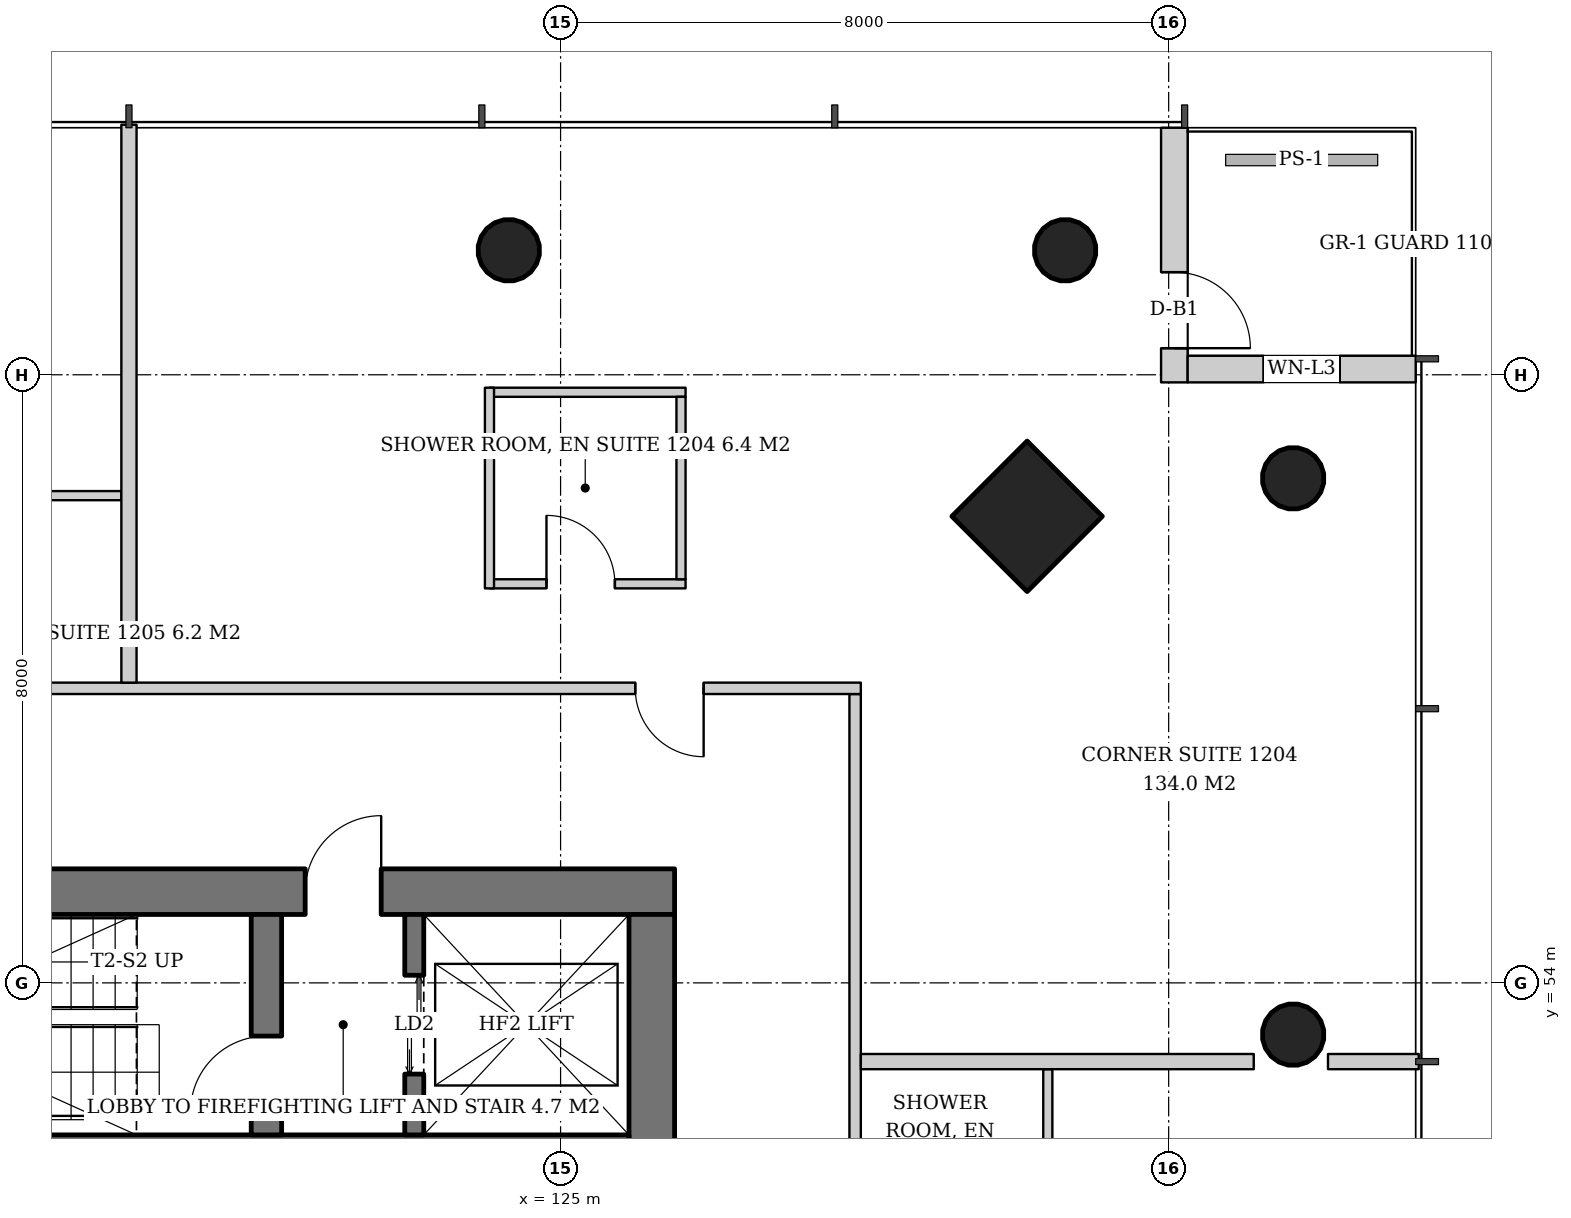
"""IFC4 building model, lengths in metres.
Left out: names, types, materials, properties, quantities, classifications, styles, units other than length and angle.
Written with IfcOpenShell. Run it as: python <this file> out.ifc"""

import sys

from ifc_helpers import new_model, si_unit, direction, frame, frame_2d, origin, origin_2d, place, context, subcontext, project, spatial, rectangle, hollow_circle, extrude, element, fill, save


model = new_model("IFC4")
c1 = context("Model", 3, precision=1e-05, world=origin(), true_north=direction((0.0, 1.0)))
c2 = subcontext(c1, "Body", "Model", "MODEL_VIEW")
j1 = project(units=[si_unit("LENGTHUNIT", "METRE"), si_unit("PLANEANGLEUNIT", "RADIAN")], contexts=[c1])
p1 = place(None, origin())
s1 = spatial("IfcSite", under=j1, at=p1, CompositionType="ELEMENT")
p2 = place(p1, origin())
s2 = spatial("IfcBuilding", under=s1, at=p2, CompositionType="ELEMENT")
p3 = place(p2, frame((0.0, 0.0, 51.4)))
s3 = spatial("IfcBuildingStorey", under=s2, at=p3, CompositionType="ELEMENT", Elevation=51.4)
p4 = place(p3, frame((131.19, 60.19, 0.0), z_axis=(-0.043029647111, -0.043029647111, 0.998146732169), x_axis=(0.707106781187, -0.707106781187, 0.0)))
e1 = element("IfcColumn", 1, at=p4, inside=s3, PredefinedType="COLUMN", context=c2, shape_type="SweptSolid", body=[
    extrude(rectangle(XDim=1.4, YDim=1.4, at=origin_2d()), origin(), (0.0, 0.0, 1.0), 3.807),
])
p5 = place(p3, frame((134.69, 60.69, 0.0), z_axis=(-0.043029647111, -0.043029647111, 0.998146732169), x_axis=(0.707106781187, -0.707106781187, 0.0)))
e2 = element("IfcColumn", 2, at=p5, inside=s3, PredefinedType="COLUMN", context=c2, shape_type="SweptSolid", body=[
    extrude(hollow_circle(Radius=0.406, WallThickness=0.03, at=origin_2d()), origin(), (0.0, 0.0, 1.0), 3.807),
])
p6 = place(p3, frame((134.69, 53.345, 0.0), z_axis=(-0.043059584825, -0.021497706284, 0.998841188968), x_axis=(0.446680166538, -0.894693706707, 0.0)))
e3 = element("IfcColumn", 3, at=p6, inside=s3, PredefinedType="COLUMN", context=c2, shape_type="SweptSolid", body=[
    extrude(hollow_circle(Radius=0.406, WallThickness=0.03, at=origin_2d()), origin(), (0.0, 0.0, 1.0), 3.804),
])
p7 = place(p3, frame((131.69, 63.69, 0.0), z_axis=(-0.043029647111, -0.043029647111, 0.998146732169), x_axis=(0.707106781187, -0.707106781187, 0.0)))
e4 = element("IfcColumn", 4, at=p7, inside=s3, PredefinedType="COLUMN", context=c2, shape_type="SweptSolid", body=[
    extrude(hollow_circle(Radius=0.406, WallThickness=0.03, at=origin_2d()), origin(), (0.0, 0.0, 1.0), 3.807),
])
p8 = place(p3, frame((124.345, 63.69, 0.0), z_axis=(-0.021497706284, -0.043059584825, 0.998841188968), x_axis=(0.894693706707, -0.446680166538, 0.0)))
e5 = element("IfcColumn", 5, at=p8, inside=s3, PredefinedType="COLUMN", context=c2, shape_type="SweptSolid", body=[
    extrude(hollow_circle(Radius=0.406, WallThickness=0.03, at=origin_2d()), origin(), (0.0, 0.0, 1.0), 3.804),
])
p9 = place(p3, frame((107.5, 55.2, 0.0), z_axis=(0.0, 0.0, 1.0), x_axis=(1.0, 0.0, 0.0)))
e6 = element("IfcWall", 6, at=p9, inside=s3, PredefinedType="SHEAR", context=c2, shape_type="SweptSolid", body=[
    extrude(rectangle(XDim=19.0, YDim=0.6, at=frame_2d((9.5, 0.0))), origin(), (0.0, 0.0, 1.0), 3.8),
])
p10 = place(p9, frame((14.14, 0.0, 0.0)))
e7 = element("IfcOpeningElement", 7, at=p10, cuts=e6, PredefinedType="OPENING", context=c2, shape_type="SweptSolid", body=[
    extrude(rectangle(XDim=1.0, YDim=2.1, at=frame_2d((0.5, 1.05))), frame((0.0, 0.31, 0.0), z_axis=(0.0, -1.0, 0.0), x_axis=(1.0, 0.0, 0.0)), (0.0, 0.0, 1.0), 0.62),
])
p11 = place(p9, frame((2.425, 0.0, 0.0)))
e8 = element("IfcOpeningElement", 8, at=p11, cuts=e6, PredefinedType="OPENING", context=c2, shape_type="SweptSolid", body=[
    extrude(rectangle(XDim=1.0, YDim=2.1, at=frame_2d((0.5, 1.05))), frame((0.0, 0.31, 0.0), z_axis=(0.0, -1.0, 0.0), x_axis=(1.0, 0.0, 0.0)), (0.0, 0.0, 1.0), 0.62),
])
p12 = place(p3, frame((126.2, 37.1, 0.0), z_axis=(0.0, 0.0, 1.0), x_axis=(0.0, 1.0, 0.0)))
e9 = element("IfcWall", 9, at=p12, inside=s3, PredefinedType="SHEAR", context=c2, shape_type="SweptSolid", body=[
    extrude(rectangle(XDim=17.8, YDim=0.6, at=frame_2d((8.9, 0.0))), origin(), (0.0, 0.0, 1.0), 3.8),
])
p13 = place(p12, frame((8.0, 0.0, 0.0)))
e10 = element("IfcOpeningElement", 10, at=p13, cuts=e9, PredefinedType="OPENING", context=c2, shape_type="SweptSolid", body=[
    extrude(rectangle(XDim=1.8, YDim=2.4, at=frame_2d((0.9, 1.2))), frame((0.0, 0.31, 0.0), z_axis=(0.0, -1.0, 0.0), x_axis=(1.0, 0.0, 0.0)), (0.0, 0.0, 1.0), 0.62),
])
p14 = place(p3, frame((108.1, 51.8, 0.0), z_axis=(0.0, 0.0, 1.0), x_axis=(1.0, 0.0, 0.0)))
e11 = element("IfcWall", 11, at=p14, inside=s3, PredefinedType="SHEAR", context=c2, shape_type="SweptSolid", body=[
    extrude(rectangle(XDim=17.8, YDim=0.4, at=frame_2d((8.9, 0.0))), origin(), (0.0, 0.0, 1.0), 3.8),
])
p15 = place(p3, frame((121.13, 52.0, 0.0), z_axis=(0.0, 0.0, 1.0), x_axis=(0.0, 1.0, 0.0)))
e12 = element("IfcWall", 12, at=p15, inside=s3, PredefinedType="SHEAR", context=c2, shape_type="SweptSolid", body=[
    extrude(rectangle(XDim=2.9, YDim=0.4, at=frame_2d((1.45, 0.0))), origin(), (0.0, 0.0, 1.0), 3.8),
])
p16 = place(p15, frame((0.3, 0.0, 0.0)))
e13 = element("IfcOpeningElement", 13, at=p16, cuts=e12, PredefinedType="OPENING", context=c2, shape_type="SweptSolid", body=[
    extrude(rectangle(XDim=1.0, YDim=2.1, at=frame_2d((0.5, 1.05))), frame((0.0, 0.21, 0.0), z_axis=(0.0, -1.0, 0.0), x_axis=(1.0, 0.0, 0.0)), (0.0, 0.0, 1.0), 0.42),
])
p17 = place(p3, frame((133.075, 65.25, 0.0), z_axis=(0.0, 0.0, 1.0), x_axis=(0.0, -1.0, 0.0)))
e14 = element("IfcWall", 14, at=p17, inside=s3, PredefinedType="SOLIDWALL", context=c2, shape_type="SweptSolid", body=[
    extrude(rectangle(XDim=3.35, YDim=0.35, at=frame_2d((1.675, 0.0))), origin(), (0.0, 0.0, 1.0), 3.6),
])
p18 = place(p17, frame((1.9, 0.0, 0.0)))
e15 = element("IfcOpeningElement", 15, at=p18, cuts=e14, PredefinedType="OPENING", context=c2, shape_type="SweptSolid", body=[
    extrude(rectangle(XDim=1.0, YDim=2.4, at=frame_2d((0.5, 1.2))), frame((0.0, 0.185, 0.0), z_axis=(0.0, -1.0, 0.0), x_axis=(1.0, 0.0, 0.0)), (0.0, 0.0, 1.0), 0.37),
])
p19 = place(p3, frame((133.25, 62.075, 0.0), z_axis=(0.0, 0.0, 1.0), x_axis=(1.0, 0.0, 0.0)))
e16 = element("IfcWall", 16, at=p19, inside=s3, PredefinedType="SOLIDWALL", context=c2, shape_type="SweptSolid", body=[
    extrude(rectangle(XDim=3.0, YDim=0.35, at=frame_2d((1.5, 0.0))), origin(), (0.0, 0.0, 1.0), 3.6),
])
p20 = place(p19, frame((1.0, 0.0, 0.9)))
e17 = element("IfcOpeningElement", 17, at=p20, cuts=e16, PredefinedType="OPENING", context=c2, shape_type="SweptSolid", body=[
    extrude(rectangle(XDim=1.0, YDim=2.4, at=frame_2d((0.5, 1.2))), frame((0.0, 0.185, 0.0), z_axis=(0.0, -1.0, 0.0), x_axis=(1.0, 0.0, 0.0)), (0.0, 0.0, 1.0), 0.37),
])
p21 = place(p3, frame((123.075, 52.0, 0.0), z_axis=(0.0, 0.0, 1.0), x_axis=(0.0, 1.0, 0.0)))
e18 = element("IfcWall", 18, at=p21, inside=s3, PredefinedType="SHEAR", context=c2, shape_type="SweptSolid", body=[
    extrude(rectangle(XDim=2.9, YDim=0.25, at=frame_2d((1.45, 0.0))), origin(), (0.0, 0.0, 1.0), 3.8),
])
p22 = place(p21, frame((0.8, 0.0, 0.0)))
e19 = element("IfcOpeningElement", 19, at=p22, cuts=e18, PredefinedType="OPENING", context=c2, shape_type="SweptSolid", body=[
    extrude(rectangle(XDim=1.3, YDim=2.2, at=frame_2d((0.65, 1.1))), frame((0.0, 0.135, 0.0), z_axis=(0.0, -1.0, 0.0), x_axis=(1.0, 0.0, 0.0)), (0.0, 0.0, 1.0), 0.27),
])
p23 = place(p3, frame((131.41, 50.144, 0.0), z_axis=(0.0, 0.0, 1.0), x_axis=(0.0, 1.0, 0.0)))
e20 = element("IfcWall", 20, at=p23, inside=s3, PredefinedType="PARTITIONING", context=c2, shape_type="SweptSolid", body=[
    extrude(rectangle(XDim=2.72, YDim=0.12, at=frame_2d((1.36, 0.0))), origin(), (0.0, 0.0, 1.0), 2.847),
])
p24 = place(p3, frame((128.875, 34.05, 0.0), z_axis=(0.0, 0.0, 1.0), x_axis=(0.0, 1.0, 0.0)))
e21 = element("IfcWall", 21, at=p24, inside=s3, PredefinedType="PARTITIONING", context=c2, shape_type="SweptSolid", body=[
    extrude(rectangle(XDim=23.75, YDim=0.15, at=frame_2d((11.875, 0.0))), origin(), (0.0, 0.0, 1.0), 2.8),
])
p25 = place(p24, frame((2.068, 0.0, 0.0)))
e22 = element("IfcOpeningElement", 22, at=p25, cuts=e21, PredefinedType="OPENING", context=c2, shape_type="SweptSolid", body=[
    extrude(rectangle(XDim=0.9, YDim=2.1, at=frame_2d((0.45, 1.05))), frame((0.0, 0.085, 0.0), z_axis=(0.0, -1.0, 0.0), x_axis=(1.0, 0.0, 0.0)), (0.0, 0.0, 1.0), 0.17),
])
p26 = place(p24, frame((7.736, 0.0, 0.0)))
e23 = element("IfcOpeningElement", 23, at=p26, cuts=e21, PredefinedType="OPENING", context=c2, shape_type="SweptSolid", body=[
    extrude(rectangle(XDim=0.9, YDim=2.1, at=frame_2d((0.45, 1.05))), frame((0.0, 0.085, 0.0), z_axis=(0.0, -1.0, 0.0), x_axis=(1.0, 0.0, 0.0)), (0.0, 0.0, 1.0), 0.17),
])
p27 = place(p24, frame((15.014, 0.0, 0.0)))
e24 = element("IfcOpeningElement", 24, at=p27, cuts=e21, PredefinedType="OPENING", context=c2, shape_type="SweptSolid", body=[
    extrude(rectangle(XDim=0.9, YDim=2.1, at=frame_2d((0.45, 1.05))), frame((0.0, 0.085, 0.0), z_axis=(0.0, -1.0, 0.0), x_axis=(1.0, 0.0, 0.0)), (0.0, 0.0, 1.0), 0.17),
])
p28 = place(p3, frame((128.95, 52.964, 0.0), z_axis=(0.0, 0.0, 1.0), x_axis=(1.0, 0.0, 0.0)))
e25 = element("IfcWall", 25, at=p28, inside=s3, PredefinedType="PARTITIONING", context=c2, shape_type="SweptSolid", body=[
    extrude(rectangle(XDim=5.169, YDim=0.2, at=frame_2d((2.585, 0.0))), origin(), (0.0, 0.0, 1.0), 3.6),
])
p29 = place(p3, frame((135.096, 52.964, 0.0), z_axis=(0.0, 0.0, 1.0), x_axis=(1.0, 0.0, 0.0)))
e26 = element("IfcWall", 26, at=p29, inside=s3, PredefinedType="PARTITIONING", context=c2, shape_type="SweptSolid", body=[
    extrude(rectangle(XDim=1.194, YDim=0.2, at=frame_2d((0.597, 0.0))), origin(), (0.0, 0.0, 1.0), 3.6),
])
p30 = place(p3, frame((124.064, 59.25, 0.0), z_axis=(0.0, 0.0, 1.0), x_axis=(1.0, 0.0, 0.0)))
e27 = element("IfcWall", 27, at=p30, inside=s3, PredefinedType="PARTITIONING", context=c2, shape_type="SweptSolid", body=[
    extrude(rectangle(XDim=2.58, YDim=0.12, at=frame_2d((1.29, 0.0))), origin(), (0.0, 0.0, 1.0), 2.8),
])
p31 = place(p30, frame((0.75, 0.0, 0.0)))
e28 = element("IfcOpeningElement", 28, at=p31, cuts=e27, PredefinedType="OPENING", context=c2, shape_type="SweptSolid", body=[
    extrude(rectangle(XDim=0.9, YDim=2.1, at=frame_2d((0.45, 1.05))), frame((0.0, 0.07, 0.0), z_axis=(0.0, -1.0, 0.0), x_axis=(1.0, 0.0, 0.0)), (0.0, 0.0, 1.0), 0.14),
])
p32 = place(p3, frame((124.064, 61.77, 0.0), z_axis=(0.0, 0.0, 1.0), x_axis=(1.0, 0.0, 0.0)))
e29 = element("IfcWall", 29, at=p32, inside=s3, PredefinedType="PARTITIONING", context=c2, shape_type="SweptSolid", body=[
    extrude(rectangle(XDim=2.58, YDim=0.12, at=frame_2d((1.29, 0.0))), origin(), (0.0, 0.0, 1.0), 2.8),
])
p33 = place(p3, frame((126.584, 59.31, 0.0), z_axis=(0.0, 0.0, 1.0), x_axis=(0.0, 1.0, 0.0)))
e30 = element("IfcWall", 30, at=p33, inside=s3, PredefinedType="PARTITIONING", context=c2, shape_type="SweptSolid", body=[
    extrude(rectangle(XDim=2.4, YDim=0.12, at=frame_2d((1.2, 0.0))), origin(), (0.0, 0.0, 1.0), 3.6),
])
p34 = place(p3, frame((124.064, 59.19, 0.0), z_axis=(0.0, 0.0, 1.0), x_axis=(0.0, 1.0, 0.0)))
e31 = element("IfcWall", 31, at=p34, inside=s3, PredefinedType="PARTITIONING", context=c2, shape_type="SweptSolid", body=[
    extrude(rectangle(XDim=2.64, YDim=0.12, at=frame_2d((1.32, 0.0))), origin(), (0.0, 0.0, 1.0), 3.6),
])
p35 = place(p3, frame((119.221, 60.41, 0.0), z_axis=(0.0, 0.0, 1.0), x_axis=(-1.0, 0.0, 0.0)))
e32 = element("IfcWall", 32, at=p35, inside=s3, PredefinedType="PARTITIONING", context=c2, shape_type="SweptSolid", body=[
    extrude(rectangle(XDim=2.42, YDim=0.12, at=frame_2d((1.21, 0.0))), origin(), (0.0, 0.0, 1.0), 2.847),
])
p36 = place(p3, frame((128.95, 57.875, 0.0), z_axis=(0.0, 0.0, 1.0), x_axis=(-1.0, 0.0, 0.0)))
e33 = element("IfcWall", 33, at=p36, inside=s3, PredefinedType="PARTITIONING", context=c2, shape_type="SweptSolid", body=[
    extrude(rectangle(XDim=23.75, YDim=0.15, at=frame_2d((11.875, 0.0))), origin(), (0.0, 0.0, 1.0), 2.8),
])
p37 = place(p36, frame((2.068, 0.0, 0.0)))
e34 = element("IfcOpeningElement", 34, at=p37, cuts=e33, PredefinedType="OPENING", context=c2, shape_type="SweptSolid", body=[
    extrude(rectangle(XDim=0.9, YDim=2.1, at=frame_2d((0.45, 1.05))), frame((0.0, 0.085, 0.0), z_axis=(0.0, -1.0, 0.0), x_axis=(1.0, 0.0, 0.0)), (0.0, 0.0, 1.0), 0.17),
])
p38 = place(p36, frame((12.379, 0.0, 0.0)))
e35 = element("IfcOpeningElement", 35, at=p38, cuts=e33, PredefinedType="OPENING", context=c2, shape_type="SweptSolid", body=[
    extrude(rectangle(XDim=0.9, YDim=2.1, at=frame_2d((0.45, 1.05))), frame((0.0, 0.085, 0.0), z_axis=(0.0, -1.0, 0.0), x_axis=(1.0, 0.0, 0.0)), (0.0, 0.0, 1.0), 0.17),
])
p39 = place(p3, frame((119.322, 57.95, 0.0), z_axis=(0.0, 0.0, 1.0), x_axis=(0.0, 1.0, 0.0)))
e36 = element("IfcWall", 36, at=p39, inside=s3, PredefinedType="PARTITIONING", context=c2, shape_type="SweptSolid", body=[
    extrude(rectangle(XDim=7.34, YDim=0.2, at=frame_2d((3.67, 0.0))), origin(), (0.0, 0.0, 1.0), 3.05),
])
p40 = place(p18, origin())
e37 = element("IfcDoor", 37, at=p40, inside=s3, OperationType="SINGLE_SWING_RIGHT", PredefinedType="DOOR", context=c2, shape_type="SweptSolid", body=[
    extrude(rectangle(XDim=1.0, YDim=2.4, at=frame_2d((0.5, 1.2))), frame((0.0, 0.025, 0.0), z_axis=(0.0, -1.0, 0.0), x_axis=(1.0, 0.0, 0.0)), (0.0, 0.0, 1.0), 0.05),
])
fill(e15, e37)
p41 = place(p20, origin())
e38 = element("IfcWindow", 38, at=p41, inside=s3, PartitioningType="SINGLE_PANEL", PredefinedType="WINDOW", context=c2, shape_type="SweptSolid", body=[
    extrude(rectangle(XDim=1.0, YDim=2.4, at=frame_2d((0.5, 1.2))), frame((0.0, 0.03, 0.0), z_axis=(0.0, -1.0, 0.0), x_axis=(1.0, 0.0, 0.0)), (0.0, 0.0, 1.0), 0.06),
])
fill(e17, e38)
p42 = place(p22, origin())
e39 = element("IfcDoor", 39, at=p42, inside=s3, OperationType="DOUBLE_DOOR_SLIDING", PredefinedType="DOOR", context=c2, shape_type="SweptSolid", body=[
    extrude(rectangle(XDim=1.3, YDim=2.2, at=frame_2d((0.65, 1.1))), frame((0.0, 0.025, 0.0), z_axis=(0.0, -1.0, 0.0), x_axis=(1.0, 0.0, 0.0)), (0.0, 0.0, 1.0), 0.05),
])
fill(e19, e39)
p43 = place(p16, origin())
e40 = element("IfcDoor", 40, at=p43, inside=s3, OperationType="SINGLE_SWING_LEFT", PredefinedType="DOOR", context=c2, shape_type="SweptSolid", body=[
    extrude(rectangle(XDim=1.0, YDim=2.1, at=frame_2d((0.5, 1.05))), frame((0.0, 0.025, 0.0), z_axis=(0.0, -1.0, 0.0), x_axis=(1.0, 0.0, 0.0)), (0.0, 0.0, 1.0), 0.05),
])
fill(e13, e40)
p44 = place(p10, origin())
e41 = element("IfcDoor", 41, at=p44, inside=s3, OperationType="SINGLE_SWING_RIGHT", PredefinedType="DOOR", context=c2, shape_type="SweptSolid", body=[
    extrude(rectangle(XDim=1.0, YDim=2.1, at=frame_2d((0.5, 1.05))), frame((0.0, 0.025, 0.0), z_axis=(0.0, -1.0, 0.0), x_axis=(1.0, 0.0, 0.0)), (0.0, 0.0, 1.0), 0.05),
])
fill(e7, e41)
p45 = place(p31, origin())
e42 = element("IfcDoor", 42, at=p45, inside=s3, OperationType="SINGLE_SWING_LEFT", PredefinedType="DOOR", context=c2, shape_type="SweptSolid", body=[
    extrude(rectangle(XDim=0.9, YDim=2.1, at=frame_2d((0.45, 1.05))), frame((0.0, 0.025, 0.0), z_axis=(0.0, -1.0, 0.0), x_axis=(1.0, 0.0, 0.0)), (0.0, 0.0, 1.0), 0.05),
])
fill(e28, e42)
p46 = place(p37, origin())
e43 = element("IfcDoor", 43, at=p46, inside=s3, OperationType="SINGLE_SWING_LEFT", PredefinedType="DOOR", context=c2, shape_type="SweptSolid", body=[
    extrude(rectangle(XDim=0.9, YDim=2.1, at=frame_2d((0.45, 1.05))), frame((0.0, 0.025, 0.0), z_axis=(0.0, -1.0, 0.0), x_axis=(1.0, 0.0, 0.0)), (0.0, 0.0, 1.0), 0.05),
])
fill(e34, e43)
save(model, sys.argv[1])
